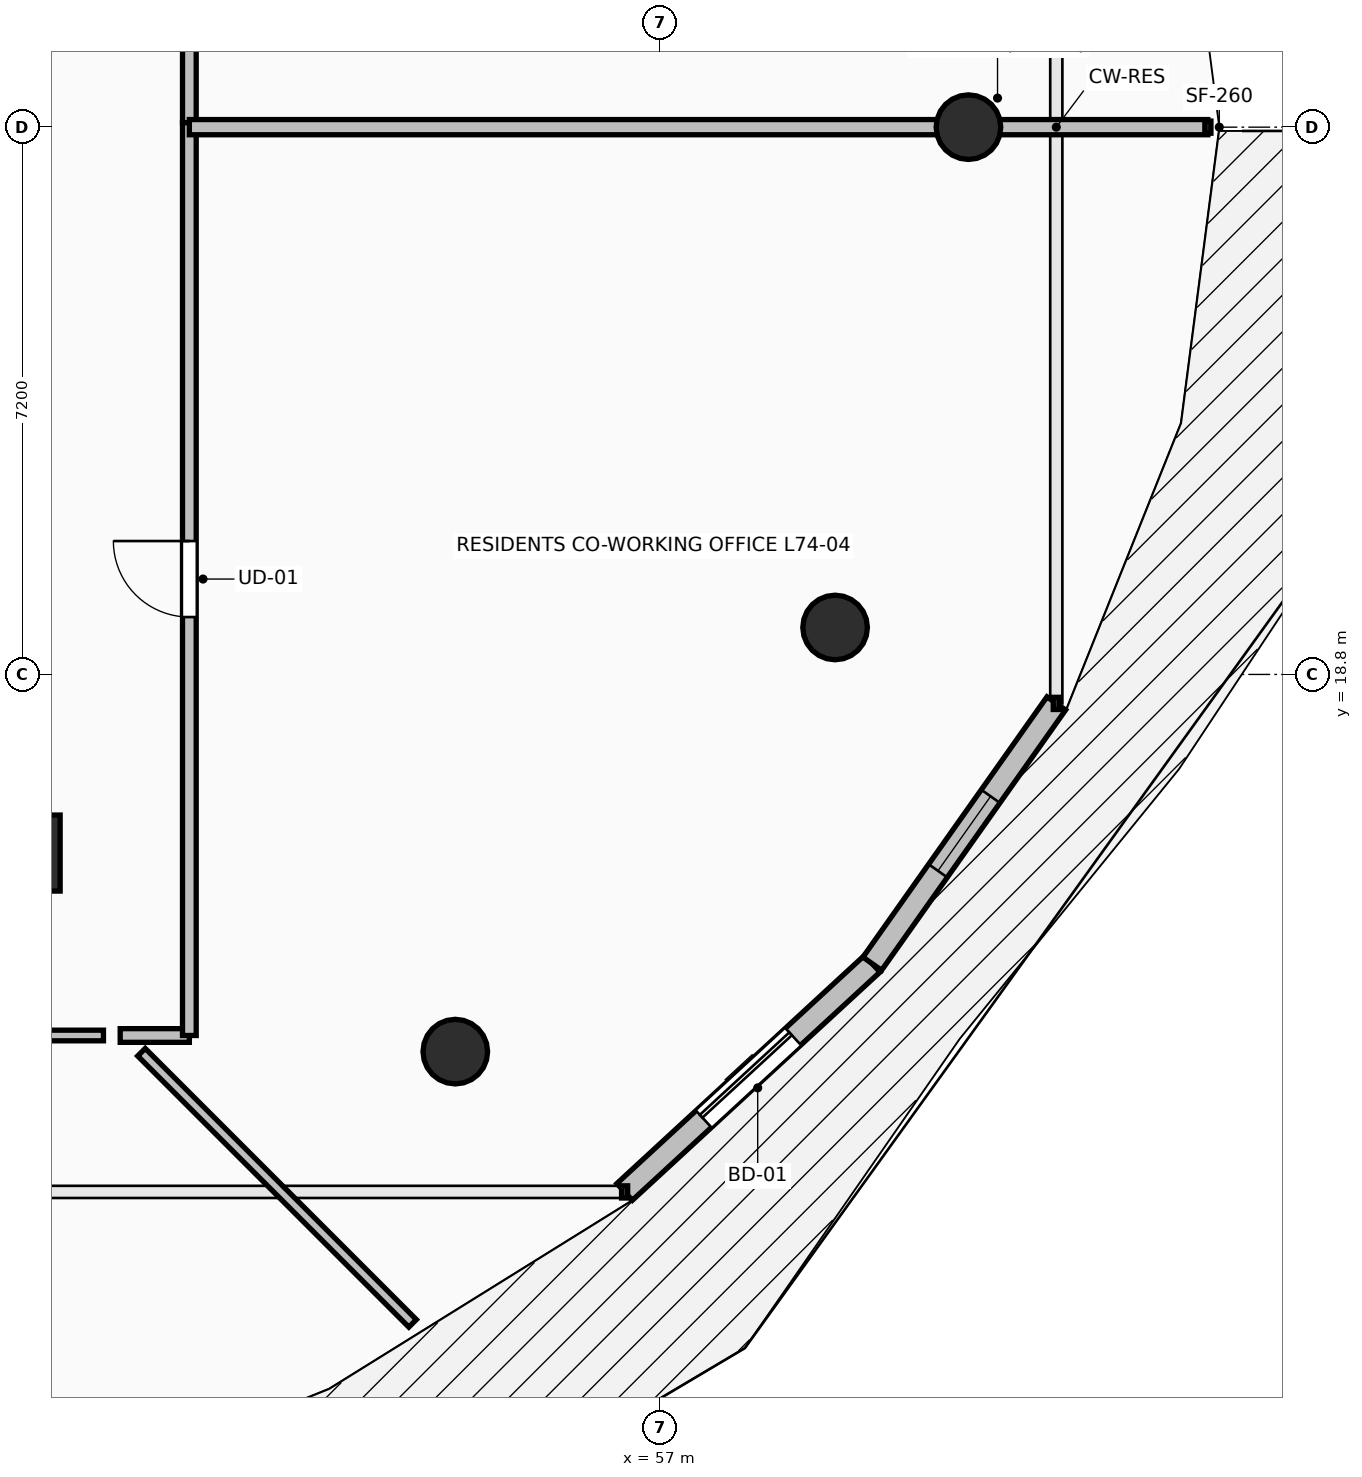
"""IFC4 building model, lengths in metres.
Left out: names, types, materials, properties, quantities, classifications, styles, units other than length and angle.
Written with IfcOpenShell. Run it as: python <this file> out.ifc"""

import sys

from ifc_helpers import new_model, si_unit, direction, frame, frame_2d, origin, origin_2d, place, context, subcontext, project, spatial, rectangle, circle, extrude, element, fill, save


model = new_model("IFC4")
c1 = context("Model", 3, precision=1e-05, world=origin(), true_north=direction((0.0, 1.0)))
c2 = subcontext(c1, "Body", "Model", "MODEL_VIEW")
j1 = project(units=[si_unit("LENGTHUNIT", "METRE"), si_unit("PLANEANGLEUNIT", "RADIAN")], contexts=[c1])
p1 = place(None, origin())
s1 = spatial("IfcSite", under=j1, at=p1, CompositionType="ELEMENT")
p2 = place(p1, origin())
s2 = spatial("IfcBuilding", under=s1, at=p2, CompositionType="ELEMENT")
p3 = place(p2, frame((0.0, 0.0, 273.3)))
s3 = spatial("IfcBuildingStorey", under=s2, at=p3, CompositionType="ELEMENT", Elevation=273.3)
for number, where, z_axis, x_axis in (
    (1, (61.05, 26.0, 0.0), (0.0, 0.0, 1.0), (1.0, 0.0, 0.0)),
    (2, (54.299, 13.838, 0.0), (0.0, 0.0, 1.0), (0.707, -0.707, 0.0)),
    (3, (59.295, 19.418, 0.0), (0.0, 0.0, 1.0), (0.924, -0.383, 0.0)),
):
    element("IfcColumn", number, at=place(p3, frame(where, z_axis=z_axis, x_axis=x_axis)), inside=s3, PredefinedType="COLUMN", context=c2, shape_type="SweptSolid", body=[
        extrude(circle(Radius=0.425, at=origin_2d()), origin(), (0.0, 0.0, 1.0), 3.55),
    ])
p4 = place(p3, frame((48.75, 16.45, 0.0), z_axis=(0.0, 0.0, 1.0), x_axis=(1.0, 0.0, 0.0)))
e4 = element("IfcColumn", 4, at=p4, inside=s3, PredefinedType="PILASTER", context=c2, shape_type="SweptSolid", body=[
    extrude(rectangle(XDim=0.7, YDim=1.0, at=origin_2d()), origin(), (0.0, 0.0, 1.0), 3.55),
])
p5 = place(p3, frame((56.526, 11.992, 0.0), z_axis=(0.0, 0.0, 1.0), x_axis=(0.735445373611, 0.677584018727, 0.0)))
e5 = element("IfcWall", 5, at=p5, inside=s3, PredefinedType="STANDARD", context=c2, shape_type="SweptSolid", body=[
    extrude(rectangle(XDim=4.43, YDim=0.3, at=frame_2d((2.215, 0.0))), origin(), (0.0, 0.0, 1.0), 3.29),
])
p6 = place(p5, frame((1.415, 0.0, 0.0)))
e6 = element("IfcOpeningElement", 6, at=p6, cuts=e5, PredefinedType="OPENING", context=c2, shape_type="SweptSolid", body=[
    extrude(rectangle(XDim=1.6, YDim=2.3, at=frame_2d((0.8, 1.15))), frame((0.0, 0.165, 0.0), z_axis=(0.0, -1.0, 0.0), x_axis=(1.0, 0.0, 0.0)), (0.0, 0.0, 1.0), 0.33),
])
p7 = place(p3, frame((59.784, 14.994, 0.0), z_axis=(0.0, 0.0, 1.0), x_axis=(0.577261247247, 0.816559521668, 0.0)))
e7 = element("IfcWall", 7, at=p7, inside=s3, PredefinedType="STANDARD", context=c2, shape_type="SweptSolid", body=[
    extrude(rectangle(XDim=4.194, YDim=0.3, at=frame_2d((2.097, 0.0))), origin(), (0.0, 0.0, 1.0), 3.29),
])
p8 = place(p7, frame((1.497, 0.0, 0.85)))
e8 = element("IfcOpeningElement", 8, at=p8, cuts=e7, PredefinedType="OPENING", context=c2, shape_type="SweptSolid", body=[
    extrude(rectangle(XDim=1.2, YDim=2.1, at=frame_2d((0.6, 1.05))), frame((0.0, 0.165, 0.0), z_axis=(0.0, -1.0, 0.0), x_axis=(1.0, 0.0, 0.0)), (0.0, 0.0, 1.0), 0.33),
])
p9 = place(p3, frame((49.89, 14.05, 0.0), z_axis=(0.0, 0.0, 1.0), x_axis=(1.0, 0.0, 0.0)))
e9 = element("IfcWall", 9, at=p9, inside=s3, PredefinedType="PARTITIONING", context=c2, shape_type="SweptSolid", body=[
    extrude(rectangle(XDim=0.91, YDim=0.18, at=frame_2d((0.455, 0.0))), origin(), (0.0, 0.0, 1.0), 2.979),
])
p10 = place(p3, frame((50.8, 14.05, 0.0), z_axis=(0.0, 0.0, 1.0), x_axis=(0.0, 1.0, 0.0)))
e10 = element("IfcWall", 10, at=p10, inside=s3, PredefinedType="PARTITIONING", context=c2, shape_type="SweptSolid", body=[
    extrude(rectangle(XDim=12.01, YDim=0.18, at=frame_2d((6.005, 0.0))), origin(), (0.0, 0.0, 1.0), 2.482),
])
p11 = place(p10, frame((5.505, 0.0, 0.0)))
e11 = element("IfcOpeningElement", 11, at=p11, cuts=e10, PredefinedType="OPENING", context=c2, shape_type="SweptSolid", body=[
    extrude(rectangle(XDim=1.0, YDim=2.15, at=frame_2d((0.5, 1.075))), frame((0.0, 0.105, 0.0), z_axis=(0.0, -1.0, 0.0), x_axis=(1.0, 0.0, 0.0)), (0.0, 0.0, 1.0), 0.21),
])
p12 = place(p3, frame((50.8, 26.06, 0.0), z_axis=(0.0, 0.0, 1.0), x_axis=(0.0, 1.0, 0.0)))
e12 = element("IfcWall", 12, at=p12, inside=s3, PredefinedType="PARTITIONING", context=c2, shape_type="SweptSolid", body=[
    extrude(rectangle(XDim=9.89, YDim=0.18, at=frame_2d((4.945, 0.0))), origin(), (0.0, 0.0, 1.0), 2.482),
])
p13 = place(p12, frame((4.445, 0.0, 0.0)))
e13 = element("IfcOpeningElement", 13, at=p13, cuts=e12, PredefinedType="OPENING", context=c2, shape_type="SweptSolid", body=[
    extrude(rectangle(XDim=1.0, YDim=2.15, at=frame_2d((0.5, 1.075))), frame((0.0, 0.105, 0.0), z_axis=(0.0, -1.0, 0.0), x_axis=(1.0, 0.0, 0.0)), (0.0, 0.0, 1.0), 0.21),
])
p14 = place(p3, frame((64.199, 26.0, 0.0), z_axis=(0.0, 0.0, 1.0), x_axis=(-1.0, 0.0, 0.0)))
e14 = element("IfcWall", 14, at=p14, inside=s3, PredefinedType="PARTITIONING", context=c2, shape_type="SweptSolid", body=[
    extrude(rectangle(XDim=13.399, YDim=0.2, at=frame_2d((6.699, 0.0))), origin(), (0.0, 0.0, 1.0), 2.482),
])
p15 = place(p3, frame((39.45, 14.05, 0.0), z_axis=(0.0, 0.0, 1.0), x_axis=(1.0, 0.0, 0.0)))
e15 = element("IfcWall", 15, at=p15, inside=s3, PredefinedType="PARTITIONING", context=c2, shape_type="SweptSolid", body=[
    extrude(rectangle(XDim=10.22, YDim=0.14, at=frame_2d((5.11, 0.0))), origin(), (0.0, 0.0, 1.0), 2.482),
])
p16 = place(p3, frame((50.17, 13.83, 0.0), z_axis=(0.0, 0.0, 1.0), x_axis=(0.707106781187, -0.707106781187, 0.0)))
e16 = element("IfcWall", 16, at=p16, inside=s3, PredefinedType="PARTITIONING", context=c2, shape_type="SweptSolid", body=[
    extrude(rectangle(XDim=5.045, YDim=0.14, at=frame_2d((2.522, 0.0))), origin(), (0.0, 0.0, 1.0), 2.874),
])
p17 = place(p6, origin())
e17 = element("IfcDoor", 17, at=p17, inside=s3, OperationType="SLIDING_TO_LEFT", PredefinedType="DOOR", context=c2, shape_type="SweptSolid", body=[
    extrude(rectangle(XDim=1.6, YDim=2.3, at=frame_2d((0.8, 1.15))), frame((0.0, 0.025, 0.0), z_axis=(0.0, -1.0, 0.0), x_axis=(1.0, 0.0, 0.0)), (0.0, 0.0, 1.0), 0.05),
])
fill(e6, e17)
p18 = place(p8, origin())
e18 = element("IfcWindow", 18, at=p18, inside=s3, PartitioningType="SINGLE_PANEL", PredefinedType="WINDOW", context=c2, shape_type="SweptSolid", body=[
    extrude(rectangle(XDim=1.2, YDim=2.1, at=frame_2d((0.6, 1.05))), frame((0.0, 0.03, 0.0), z_axis=(0.0, -1.0, 0.0), x_axis=(1.0, 0.0, 0.0)), (0.0, 0.0, 1.0), 0.06),
])
fill(e8, e18)
p19 = place(p11, origin())
e19 = element("IfcDoor", 19, at=p19, inside=s3, OperationType="SINGLE_SWING_RIGHT", PredefinedType="DOOR", context=c2, shape_type="SweptSolid", body=[
    extrude(rectangle(XDim=1.0, YDim=2.15, at=frame_2d((0.5, 1.075))), frame((0.0, 0.025, 0.0), z_axis=(0.0, -1.0, 0.0), x_axis=(1.0, 0.0, 0.0)), (0.0, 0.0, 1.0), 0.05),
])
fill(e11, e19)
save(model, sys.argv[1])
